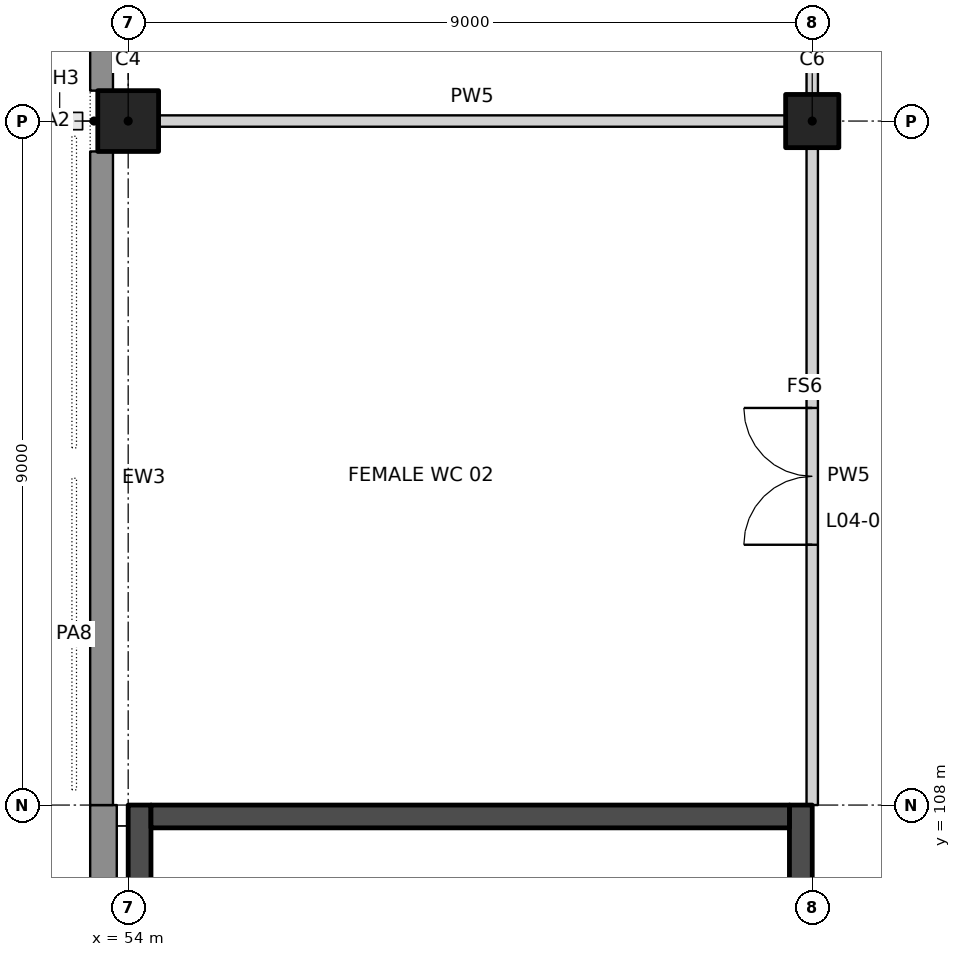
"""IFC4 building model, lengths in metres.
Left out: names, types, materials, properties, quantities, classifications, styles, units other than length and angle.
Written with IfcOpenShell. Run it as: python <this file> out.ifc"""

import sys

from ifc_helpers import new_model, si_unit, direction, frame, frame_2d, origin, origin_2d, place, context, subcontext, project, spatial, rectangle, extrude, element, fill, save


model = new_model("IFC4")
c1 = context("Model", 3, precision=1e-05, world=origin(), true_north=direction((0.0, 1.0)))
c2 = subcontext(c1, "Body", "Model", "MODEL_VIEW")
j1 = project(units=[si_unit("LENGTHUNIT", "METRE"), si_unit("PLANEANGLEUNIT", "RADIAN")], contexts=[c1])
p1 = place(None, origin())
s1 = spatial("IfcSite", under=j1, at=p1, CompositionType="ELEMENT")
p2 = place(p1, origin())
s2 = spatial("IfcBuilding", under=s1, at=p2, CompositionType="ELEMENT")
p3 = place(p2, frame((0.0, 0.0, 28.0)))
s3 = spatial("IfcBuildingStorey", under=s2, at=p3, CompositionType="ELEMENT", Elevation=28.0)
p4 = place(p3, frame((54.0, 117.0, 0.0), z_axis=(0.0, 0.0, 1.0), x_axis=(1.0, 0.0, 0.0)))
e1 = element("IfcColumn", 1, at=p4, inside=s3, PredefinedType="COLUMN", context=c2, shape_type="SweptSolid", body=[
    extrude(rectangle(XDim=0.8, YDim=0.8, at=origin_2d()), origin(), (0.0, 0.0, 1.0), 5.5),
])
p5 = place(p3, frame((63.0, 117.0, 0.0), z_axis=(0.0, 0.0, 1.0), x_axis=(1.0, 0.0, 0.0)))
e2 = element("IfcColumn", 2, at=p5, inside=s3, PredefinedType="COLUMN", context=c2, shape_type="SweptSolid", body=[
    extrude(rectangle(XDim=0.7, YDim=0.7, at=origin_2d()), origin(), (0.0, 0.0, 1.0), 5.5),
])
p6 = place(p3, frame((54.4, 117.0, 0.0), z_axis=(0.0, 0.0, 1.0), x_axis=(1.0, 0.0, 0.0)))
e3 = element("IfcWall", 3, at=p6, inside=s3, PredefinedType="PARTITIONING", context=c2, shape_type="SweptSolid", body=[
    extrude(rectangle(XDim=8.25, YDim=0.15, at=frame_2d((4.125, 0.0))), origin(), (0.0, 0.0, 1.0), 9.5),
])
p7 = place(p3, frame((63.0, 108.0, 0.0), z_axis=(0.0, 0.0, 1.0), x_axis=(0.0, 1.0, 0.0)))
e4 = element("IfcWall", 4, at=p7, inside=s3, PredefinedType="PARTITIONING", context=c2, shape_type="SweptSolid", body=[
    extrude(rectangle(XDim=8.65, YDim=0.15, at=frame_2d((4.325, 0.0))), origin(), (0.0, 0.0, 1.0), 4.2),
])
p8 = place(p7, frame((3.425, 0.0, 0.0)))
e5 = element("IfcOpeningElement", 5, at=p8, cuts=e4, PredefinedType="OPENING", context=c2, shape_type="SweptSolid", body=[
    extrude(rectangle(XDim=1.8, YDim=2.1, at=frame_2d((0.9, 1.05))), frame((0.0, 0.085, 0.0), z_axis=(0.0, -1.0, 0.0), x_axis=(1.0, 0.0, 0.0)), (0.0, 0.0, 1.0), 0.17),
])
p9 = place(p3, frame((63.0, 117.35, 0.0), z_axis=(0.0, 0.0, 1.0), x_axis=(0.0, 1.0, 0.0)))
e6 = element("IfcWall", 6, at=p9, inside=s3, PredefinedType="PARTITIONING", context=c2, shape_type="SweptSolid", body=[
    extrude(rectangle(XDim=8.3, YDim=0.15, at=frame_2d((4.15, 0.0))), origin(), (0.0, 0.0, 1.0), 4.2),
])
p10 = place(p9, frame((3.25, 0.0, 0.0)))
e7 = element("IfcOpeningElement", 7, at=p10, cuts=e6, PredefinedType="OPENING", context=c2, shape_type="SweptSolid", body=[
    extrude(rectangle(XDim=1.8, YDim=2.1, at=frame_2d((0.9, 1.05))), frame((0.0, 0.085, 0.0), z_axis=(0.0, -1.0, 0.0), x_axis=(1.0, 0.0, 0.0)), (0.0, 0.0, 1.0), 0.17),
])
p11 = place(p3, frame((53.675, 108.0, 0.0), z_axis=(0.0, 0.0, 1.0), x_axis=(0.0, -1.0, 0.0)))
e8 = element("IfcWall", 8, at=p11, inside=s3, PredefinedType="SOLIDWALL", context=c2, shape_type="SweptSolid", body=[
    extrude(rectangle(XDim=9.0, YDim=0.35, at=frame_2d((4.5, 0.0))), origin(), (0.0, 0.0, 1.0), 5.5),
])
p12 = place(p3, frame((53.65, 116.6, 0.0), z_axis=(0.0, 0.0, 1.0), x_axis=(0.0, -1.0, 0.0)))
e9 = element("IfcWall", 9, at=p12, inside=s3, PredefinedType="SOLIDWALL", context=c2, shape_type="SweptSolid", body=[
    extrude(rectangle(XDim=8.6, YDim=0.3, at=frame_2d((4.3, 0.0))), origin(), (0.0, 0.0, 1.0), 5.5),
])
p13 = place(p3, frame((53.65, 125.6, 0.0), z_axis=(0.0, 0.0, 1.0), x_axis=(0.0, -1.0, 0.0)))
e10 = element("IfcWall", 10, at=p13, inside=s3, PredefinedType="SOLIDWALL", context=c2, shape_type="SweptSolid", body=[
    extrude(rectangle(XDim=8.2, YDim=0.3, at=frame_2d((4.1, 0.0))), origin(), (0.0, 0.0, 1.0), 5.5),
])
p14 = place(p3, frame((62.85, 108.0, 0.0), z_axis=(0.0, 0.0, 1.0), x_axis=(0.0, -1.0, 0.0)))
e11 = element("IfcWall", 11, at=p14, inside=s3, PredefinedType="SHEAR", context=c2, shape_type="SweptSolid", body=[
    extrude(rectangle(XDim=18.0, YDim=0.3, at=frame_2d((9.0, 0.0))), origin(), (0.0, 0.0, 1.0), 5.5),
])
p15 = place(p14, frame((1.5, 0.0, 0.0)))
e12 = element("IfcOpeningElement", 12, at=p15, cuts=e11, PredefinedType="OPENING", context=c2, shape_type="SweptSolid", body=[
    extrude(rectangle(XDim=1.2, YDim=2.1, at=frame_2d((0.6, 1.05))), frame((0.0, 0.16, 0.0), z_axis=(0.0, -1.0, 0.0), x_axis=(1.0, 0.0, 0.0)), (0.0, 0.0, 1.0), 0.32),
])
p16 = place(p3, frame((54.15, 108.0, 0.0), z_axis=(0.0, 0.0, 1.0), x_axis=(0.0, -1.0, 0.0)))
e13 = element("IfcWall", 13, at=p16, inside=s3, PredefinedType="SHEAR", context=c2, shape_type="SweptSolid", body=[
    extrude(rectangle(XDim=18.0, YDim=0.3, at=frame_2d((9.0, 0.0))), origin(), (0.0, 0.0, 1.0), 5.5),
])
p17 = place(p3, frame((62.7, 107.85, 0.0), z_axis=(0.0, 0.0, 1.0), x_axis=(-1.0, 0.0, 0.0)))
e14 = element("IfcWall", 14, at=p17, inside=s3, PredefinedType="SHEAR", context=c2, shape_type="SweptSolid", body=[
    extrude(rectangle(XDim=8.4, YDim=0.3, at=frame_2d((4.2, 0.0))), origin(), (0.0, 0.0, 1.0), 5.5),
])
p18 = place(p8, origin())
e15 = element("IfcDoor", 15, at=p18, inside=s3, OperationType="DOUBLE_DOOR_DOUBLE_SWING", PredefinedType="DOOR", context=c2, shape_type="SweptSolid", body=[
    extrude(rectangle(XDim=1.8, YDim=2.1, at=frame_2d((0.9, 1.05))), frame((0.0, 0.025, 0.0), z_axis=(0.0, -1.0, 0.0), x_axis=(1.0, 0.0, 0.0)), (0.0, 0.0, 1.0), 0.05),
])
fill(e5, e15)
save(model, sys.argv[1])
